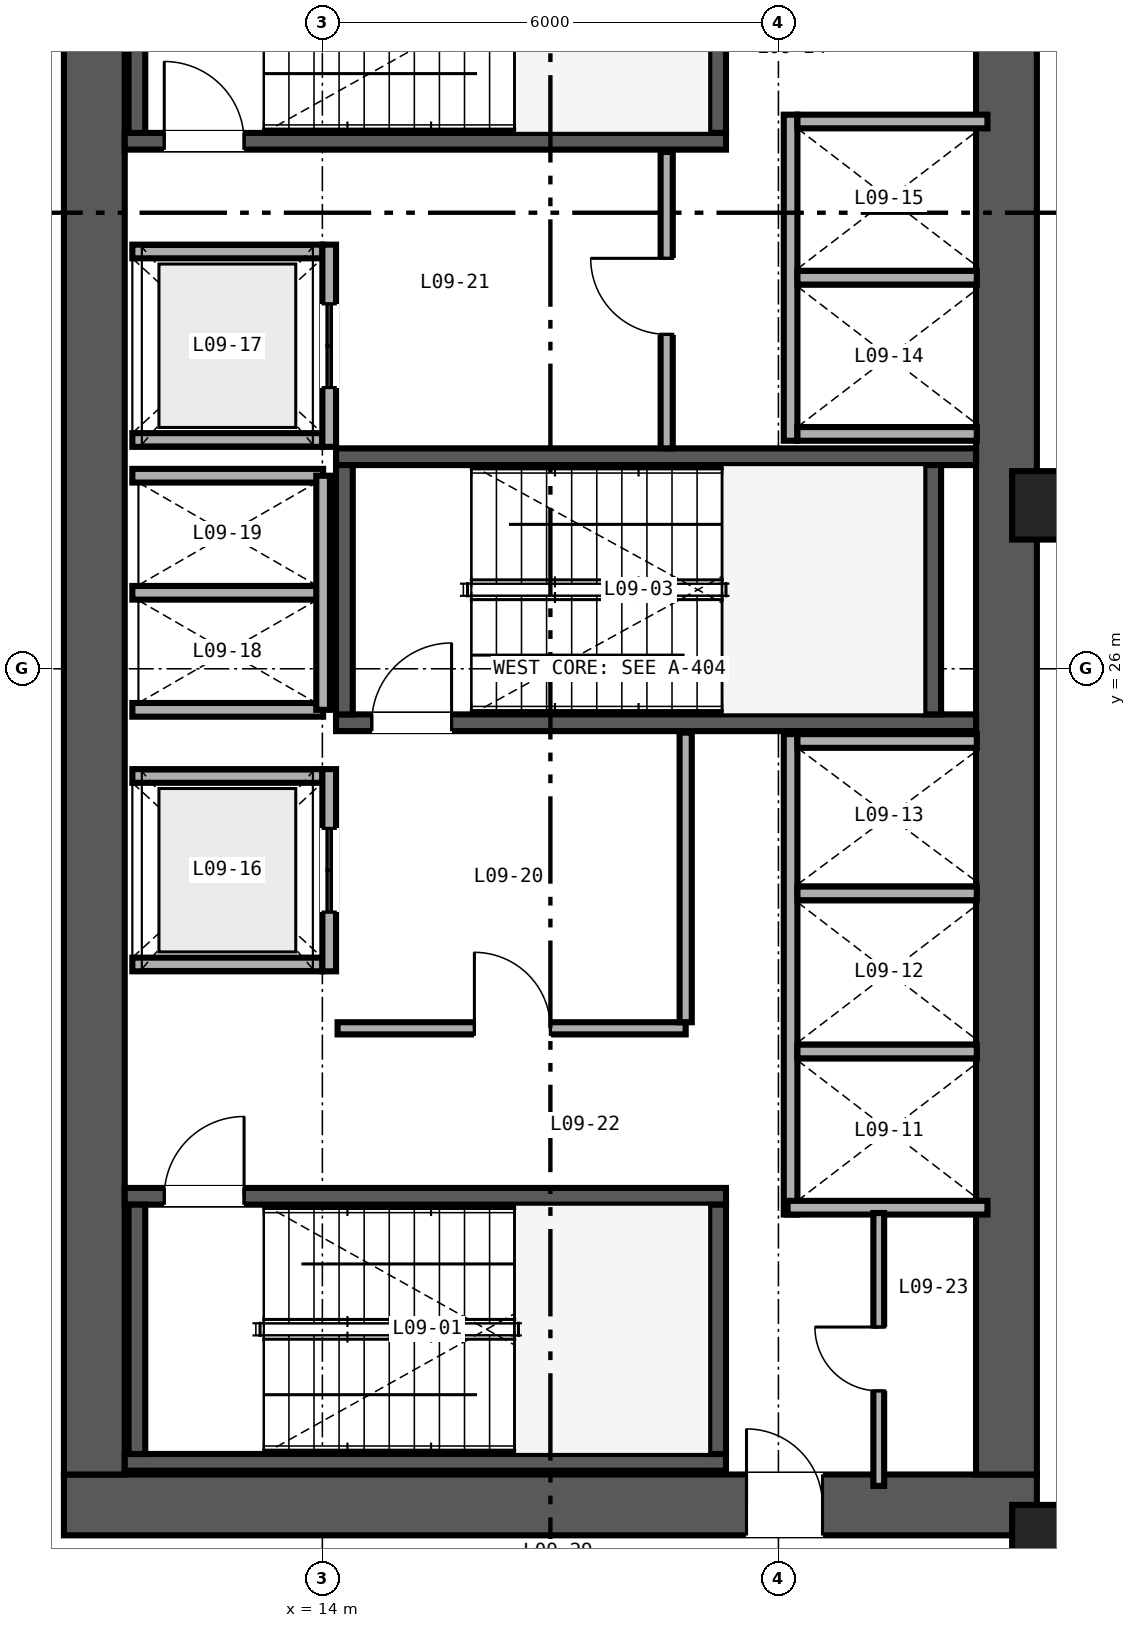
"""IFC4 building model, lengths in metres.
Left out: names, types, materials, properties, quantities, classifications, styles, units other than length and angle.
Written with IfcOpenShell. Run it as: python <this file> out.ifc"""

import sys

from ifc_helpers import new_model, si_unit, direction, frame, frame_2d, origin, origin_2d, place, context, subcontext, project, spatial, rectangle, hollow_rectangle, extrude, source, transform, mapped, element, fill, save


model = new_model("IFC4")
c1 = context("Model", 3, precision=1e-05, world=origin(), true_north=direction((0.0, 1.0)))
c2 = subcontext(c1, "Body", "Model", "MODEL_VIEW")
j1 = project(units=[si_unit("LENGTHUNIT", "METRE"), si_unit("PLANEANGLEUNIT", "RADIAN")], contexts=[c1])
p1 = place(None, origin())
s1 = spatial("IfcSite", under=j1, at=p1, CompositionType="ELEMENT")
p2 = place(p1, origin())
s2 = spatial("IfcBuilding", under=s1, at=p2, CompositionType="ELEMENT")
p3 = place(p2, frame((0.0, 0.0, 42.0)))
s3 = spatial("IfcBuildingStorey", under=s2, at=p3, CompositionType="ELEMENT", Elevation=42.0)
p4 = place(p3, frame((10.6, 15.0, 0.0), z_axis=(0.0, 0.0, 1.0), x_axis=(1.0, 0.0, 0.0)))
e1 = element("IfcWall", 1, at=p4, inside=s3, PredefinedType="SHEAR", context=c2, shape_type="SweptSolid", body=[
    extrude(rectangle(XDim=12.8, YDim=0.8, at=frame_2d((6.4, 0.0))), origin(), (0.0, 0.0, 1.0), 3.35),
])
p5 = place(p4, frame((8.98, 0.0, 0.0)))
e2 = element("IfcOpeningElement", 2, at=p5, cuts=e1, PredefinedType="OPENING", context=c2, shape_type="SweptSolid", body=[
    extrude(rectangle(XDim=1.0, YDim=2.15, at=frame_2d((0.5, 1.075))), frame((0.0, 0.41, 0.0), z_axis=(0.0, -1.0, 0.0), x_axis=(1.0, 0.0, 0.0)), (0.0, 0.0, 1.0), 0.82),
])
for number, where, z_axis, x_axis in (
    (3, (11.0, 15.4, 0.0), (0.0, 0.0, 1.0), (0.0, 1.0, 0.0)),
    (4, (23.0, 15.4, 0.0), (0.0, 0.0, 1.0), (0.0, 1.0, 0.0)),
):
    element("IfcWall", number, at=place(p3, frame(where, z_axis=z_axis, x_axis=x_axis)), inside=s3, PredefinedType="SHEAR", context=c2, shape_type="SweptSolid", body=[
        extrude(rectangle(XDim=21.2, YDim=0.8, at=frame_2d((10.6, 0.0))), origin(), (0.0, 0.0, 1.0), 3.35),
    ])
p6 = place(p3, frame((11.4, 15.56, 0.0), z_axis=(0.0, 0.0, 1.0), x_axis=(1.0, 0.0, 0.0)))
e5 = element("IfcWall", 5, at=p6, inside=s3, PredefinedType="SHEAR", context=c2, shape_type="SweptSolid", body=[
    extrude(rectangle(XDim=7.91, YDim=0.22, at=frame_2d((3.955, 0.0))), origin(), (0.0, 0.0, 1.0), 3.4),
])
p7 = place(p3, frame((11.4, 19.06, 0.0), z_axis=(0.0, 0.0, 1.0), x_axis=(1.0, 0.0, 0.0)))
e6 = element("IfcWall", 6, at=p7, inside=s3, PredefinedType="SHEAR", context=c2, shape_type="SweptSolid", body=[
    extrude(rectangle(XDim=7.91, YDim=0.22, at=frame_2d((3.955, 0.0))), origin(), (0.0, 0.0, 1.0), 3.4),
])
p8 = place(p7, frame((0.52, 0.0, 0.0)))
e7 = element("IfcOpeningElement", 7, at=p8, cuts=e6, PredefinedType="OPENING", context=c2, shape_type="SweptSolid", body=[
    extrude(rectangle(XDim=1.05, YDim=2.15, at=frame_2d((0.525, 1.075))), frame((0.0, 0.12, 0.0), z_axis=(0.0, -1.0, 0.0), x_axis=(1.0, 0.0, 0.0)), (0.0, 0.0, 1.0), 0.24),
])
for number, where, z_axis, x_axis in (
    (8, (11.56, 15.67, 0.0), (0.0, 0.0, 1.0), (0.0, 1.0, 0.0)),
    (9, (19.2, 15.67, 0.0), (0.0, 0.0, 1.0), (0.0, 1.0, 0.0)),
):
    element("IfcWall", number, at=place(p3, frame(where, z_axis=z_axis, x_axis=x_axis)), inside=s3, PredefinedType="SHEAR", context=c2, shape_type="SweptSolid", body=[
        extrude(rectangle(XDim=3.28, YDim=0.22, at=frame_2d((1.64, 0.0))), origin(), (0.0, 0.0, 1.0), 3.4),
    ])
p9 = place(p3, frame((11.4, 32.94, 0.0), z_axis=(0.0, 0.0, 1.0), x_axis=(1.0, 0.0, 0.0)))
e10 = element("IfcWall", 10, at=p9, inside=s3, PredefinedType="SHEAR", context=c2, shape_type="SweptSolid", body=[
    extrude(rectangle(XDim=7.91, YDim=0.22, at=frame_2d((3.955, 0.0))), origin(), (0.0, 0.0, 1.0), 3.4),
])
p10 = place(p9, frame((0.52, 0.0, 0.0)))
e11 = element("IfcOpeningElement", 11, at=p10, cuts=e10, PredefinedType="OPENING", context=c2, shape_type="SweptSolid", body=[
    extrude(rectangle(XDim=1.05, YDim=2.15, at=frame_2d((0.525, 1.075))), frame((0.0, 0.12, 0.0), z_axis=(0.0, -1.0, 0.0), x_axis=(1.0, 0.0, 0.0)), (0.0, 0.0, 1.0), 0.24),
])
for number, where, z_axis, x_axis in (
    (12, (11.56, 33.05, 0.0), (0.0, 0.0, 1.0), (0.0, 1.0, 0.0)),
    (13, (19.2, 33.05, 0.0), (0.0, 0.0, 1.0), (0.0, 1.0, 0.0)),
):
    element("IfcWall", number, at=place(p3, frame(where, z_axis=z_axis, x_axis=x_axis)), inside=s3, PredefinedType="SHEAR", context=c2, shape_type="SweptSolid", body=[
        extrude(rectangle(XDim=3.28, YDim=0.22, at=frame_2d((1.64, 0.0))), origin(), (0.0, 0.0, 1.0), 3.4),
    ])
p11 = place(p3, frame((14.18, 25.29, 0.0), z_axis=(0.0, 0.0, 1.0), x_axis=(1.0, 0.0, 0.0)))
e14 = element("IfcWall", 14, at=p11, inside=s3, PredefinedType="SHEAR", context=c2, shape_type="SweptSolid", body=[
    extrude(rectangle(XDim=8.42, YDim=0.22, at=frame_2d((4.21, 0.0))), origin(), (0.0, 0.0, 1.0), 3.4),
])
p12 = place(p11, frame((0.47, 0.0, 0.0)))
e15 = element("IfcOpeningElement", 15, at=p12, cuts=e14, PredefinedType="OPENING", context=c2, shape_type="SweptSolid", body=[
    extrude(rectangle(XDim=1.05, YDim=2.15, at=frame_2d((0.525, 1.075))), frame((0.0, 0.12, 0.0), z_axis=(0.0, -1.0, 0.0), x_axis=(1.0, 0.0, 0.0)), (0.0, 0.0, 1.0), 0.24),
])
p13 = place(p3, frame((14.18, 28.79, 0.0), z_axis=(0.0, 0.0, 1.0), x_axis=(1.0, 0.0, 0.0)))
e16 = element("IfcWall", 16, at=p13, inside=s3, PredefinedType="SHEAR", context=c2, shape_type="SweptSolid", body=[
    extrude(rectangle(XDim=8.42, YDim=0.22, at=frame_2d((4.21, 0.0))), origin(), (0.0, 0.0, 1.0), 3.4),
])
for number, where, z_axis, x_axis in (
    (17, (14.29, 25.4, 0.0), (0.0, 0.0, 1.0), (0.0, 1.0, 0.0)),
    (18, (22.03, 25.4, 0.0), (0.0, 0.0, 1.0), (0.0, 1.0, 0.0)),
):
    element("IfcWall", number, at=place(p3, frame(where, z_axis=z_axis, x_axis=x_axis)), inside=s3, PredefinedType="SHEAR", context=c2, shape_type="SweptSolid", body=[
        extrude(rectangle(XDim=3.28, YDim=0.22, at=frame_2d((1.64, 0.0))), origin(), (0.0, 0.0, 1.0), 3.4),
    ])
m1 = source(origin(), c2, "Body", "SweptSolid", [
    extrude(hollow_rectangle(XDim=0.85, YDim=0.9, WallThickness=0.04, at=origin_2d()), origin(), (0.0, 0.0, 1.0), 3.35),
])
for number, where, z_axis, x_axis in (
    (19, (23.5, 14.55, 0.0), (0.0, 0.0, 1.0), (1.0, 0.0, 0.0)),
    (20, (23.5, 28.15, 0.0), (0.0, 0.0, 1.0), (1.0, 0.0, 0.0)),
):
    element("IfcColumn", number, at=place(p3, frame(where, z_axis=z_axis, x_axis=x_axis)), inside=s3, PredefinedType="COLUMN", context=c2, shape_type="MappedRepresentation", body=[
        mapped(m1, transform((0.0, 0.0, 0.0), scale=1.0)),
    ])
p14 = place(p3, frame((20.16, 18.82, 0.0), z_axis=(0.0, 0.0, 1.0), x_axis=(0.0, 1.0, 0.0)))
e21 = element("IfcWall", 21, at=p14, inside=s3, PredefinedType="SOLIDWALL", context=c2, shape_type="SweptSolid", body=[
    extrude(rectangle(XDim=6.32, YDim=0.18, at=frame_2d((3.16, 0.0))), origin(), (0.0, 0.0, 1.0), 2.36),
])
p15 = place(p3, frame((20.12, 18.91, 0.0), z_axis=(0.0, 0.0, 1.0), x_axis=(1.0, 0.0, 0.0)))
e22 = element("IfcWall", 22, at=p15, inside=s3, PredefinedType="SOLIDWALL", context=c2, shape_type="SweptSolid", body=[
    extrude(rectangle(XDim=2.63, YDim=0.18, at=frame_2d((1.315, 0.0))), origin(), (0.0, 0.0, 1.0), 3.35),
])
p16 = place(p3, frame((20.25, 25.05, 0.0), z_axis=(0.0, 0.0, 1.0), x_axis=(1.0, 0.0, 0.0)))
e23 = element("IfcWall", 23, at=p16, inside=s3, PredefinedType="SOLIDWALL", context=c2, shape_type="SweptSolid", body=[
    extrude(rectangle(XDim=2.36, YDim=0.18, at=frame_2d((1.18, 0.0))), origin(), (0.0, 0.0, 1.0), 3.35),
])
p17 = place(p3, frame((20.25, 20.965, 0.0), z_axis=(0.0, 0.0, 1.0), x_axis=(1.0, 0.0, 0.0)))
e24 = element("IfcWall", 24, at=p17, inside=s3, PredefinedType="SOLIDWALL", context=c2, shape_type="SweptSolid", body=[
    extrude(rectangle(XDim=2.36, YDim=0.18, at=frame_2d((1.18, 0.0))), origin(), (0.0, 0.0, 1.0), 2.36),
])
p18 = place(p3, frame((20.25, 23.045, 0.0), z_axis=(0.0, 0.0, 1.0), x_axis=(1.0, 0.0, 0.0)))
e25 = element("IfcWall", 25, at=p18, inside=s3, PredefinedType="SOLIDWALL", context=c2, shape_type="SweptSolid", body=[
    extrude(rectangle(XDim=2.36, YDim=0.18, at=frame_2d((1.18, 0.0))), origin(), (0.0, 0.0, 1.0), 3.35),
])
p19 = place(p3, frame((20.16, 29.0, 0.0), z_axis=(0.0, 0.0, 1.0), x_axis=(0.0, 1.0, 0.0)))
e26 = element("IfcWall", 26, at=p19, inside=s3, PredefinedType="SOLIDWALL", context=c2, shape_type="SweptSolid", body=[
    extrude(rectangle(XDim=4.29, YDim=0.18, at=frame_2d((2.145, 0.0))), origin(), (0.0, 0.0, 1.0), 3.35),
])
p20 = place(p3, frame((20.25, 29.09, 0.0), z_axis=(0.0, 0.0, 1.0), x_axis=(1.0, 0.0, 0.0)))
e27 = element("IfcWall", 27, at=p20, inside=s3, PredefinedType="SOLIDWALL", context=c2, shape_type="SweptSolid", body=[
    extrude(rectangle(XDim=2.36, YDim=0.18, at=frame_2d((1.18, 0.0))), origin(), (0.0, 0.0, 1.0), 3.35),
])
p21 = place(p3, frame((20.25, 33.2, 0.0), z_axis=(0.0, 0.0, 1.0), x_axis=(1.0, 0.0, 0.0)))
e28 = element("IfcWall", 28, at=p21, inside=s3, PredefinedType="SOLIDWALL", context=c2, shape_type="SweptSolid", body=[
    extrude(rectangle(XDim=2.5, YDim=0.18, at=frame_2d((1.25, 0.0))), origin(), (0.0, 0.0, 1.0), 3.35),
])
p22 = place(p3, frame((20.25, 31.145, 0.0), z_axis=(0.0, 0.0, 1.0), x_axis=(1.0, 0.0, 0.0)))
e29 = element("IfcWall", 29, at=p22, inside=s3, PredefinedType="SOLIDWALL", context=c2, shape_type="SweptSolid", body=[
    extrude(rectangle(XDim=2.36, YDim=0.18, at=frame_2d((1.18, 0.0))), origin(), (0.0, 0.0, 1.0), 3.35),
])
for number, where, z_axis, x_axis in (
    (30, (11.5, 22.11, 0.0), (0.0, 0.0, 1.0), (1.0, 0.0, 0.0)),
    (31, (11.5, 24.59, 0.0), (0.0, 0.0, 1.0), (1.0, 0.0, 0.0)),
):
    element("IfcWall", number, at=place(p3, frame(where, z_axis=z_axis, x_axis=x_axis)), inside=s3, PredefinedType="SOLIDWALL", context=c2, shape_type="SweptSolid", body=[
        extrude(rectangle(XDim=2.5, YDim=0.18, at=frame_2d((1.25, 0.0))), origin(), (0.0, 0.0, 1.0), 3.35),
    ])
p23 = place(p3, frame((14.09, 22.02, 0.0), z_axis=(0.0, 0.0, 1.0), x_axis=(0.0, 1.0, 0.0)))
e32 = element("IfcWall", 32, at=p23, inside=s3, PredefinedType="SOLIDWALL", context=c2, shape_type="SweptSolid", body=[
    extrude(rectangle(XDim=2.66, YDim=0.18, at=frame_2d((1.33, 0.0))), origin(), (0.0, 0.0, 1.0), 3.35),
])
p24 = place(p23, frame((0.78, 0.0, 0.0)))
e33 = element("IfcOpeningElement", 33, at=p24, cuts=e32, PredefinedType="OPENING", context=c2, shape_type="SweptSolid", body=[
    extrude(rectangle(XDim=1.1, YDim=2.2, at=frame_2d((0.55, 1.1))), frame((0.0, 0.1, 0.0), z_axis=(0.0, -1.0, 0.0), x_axis=(1.0, 0.0, 0.0)), (0.0, 0.0, 1.0), 0.2),
])
for number, where, z_axis, x_axis in (
    (34, (11.5, 29.01, 0.0), (0.0, 0.0, 1.0), (1.0, 0.0, 0.0)),
    (35, (11.5, 31.49, 0.0), (0.0, 0.0, 1.0), (1.0, 0.0, 0.0)),
):
    element("IfcWall", number, at=place(p3, frame(where, z_axis=z_axis, x_axis=x_axis)), inside=s3, PredefinedType="SOLIDWALL", context=c2, shape_type="SweptSolid", body=[
        extrude(rectangle(XDim=2.5, YDim=0.18, at=frame_2d((1.25, 0.0))), origin(), (0.0, 0.0, 1.0), 3.35),
    ])
p25 = place(p3, frame((14.09, 28.92, 0.0), z_axis=(0.0, 0.0, 1.0), x_axis=(0.0, 1.0, 0.0)))
e36 = element("IfcWall", 36, at=p25, inside=s3, PredefinedType="SOLIDWALL", context=c2, shape_type="SweptSolid", body=[
    extrude(rectangle(XDim=2.66, YDim=0.18, at=frame_2d((1.33, 0.0))), origin(), (0.0, 0.0, 1.0), 3.35),
])
p26 = place(p25, frame((0.78, 0.0, 0.0)))
e37 = element("IfcOpeningElement", 37, at=p26, cuts=e36, PredefinedType="OPENING", context=c2, shape_type="SweptSolid", body=[
    extrude(rectangle(XDim=1.1, YDim=2.2, at=frame_2d((0.55, 1.1))), frame((0.0, 0.1, 0.0), z_axis=(0.0, -1.0, 0.0), x_axis=(1.0, 0.0, 0.0)), (0.0, 0.0, 1.0), 0.2),
])
for number, where, z_axis, x_axis in (
    (38, (11.5, 25.46, 0.0), (0.0, 0.0, 1.0), (1.0, 0.0, 0.0)),
    (39, (11.5, 27.0, 0.0), (0.0, 0.0, 1.0), (1.0, 0.0, 0.0)),
    (40, (11.5, 28.54, 0.0), (0.0, 0.0, 1.0), (1.0, 0.0, 0.0)),
):
    element("IfcWall", number, at=place(p3, frame(where, z_axis=z_axis, x_axis=x_axis)), inside=s3, PredefinedType="SOLIDWALL", context=c2, shape_type="SweptSolid", body=[
        extrude(rectangle(XDim=2.51, YDim=0.18, at=frame_2d((1.255, 0.0))), origin(), (0.0, 0.0, 1.0), 3.35),
    ])
p27 = place(p3, frame((14.01, 25.46, 0.0), z_axis=(0.0, 0.0, 1.0), x_axis=(0.0, 1.0, 0.0)))
e41 = element("IfcWall", 41, at=p27, inside=s3, PredefinedType="SOLIDWALL", context=c2, shape_type="SweptSolid", body=[
    extrude(rectangle(XDim=3.08, YDim=0.18, at=frame_2d((1.54, 0.0))), origin(), (0.0, 0.0, 1.0), 3.35),
])
p28 = place(p3, frame((14.2, 21.27, 0.0), z_axis=(0.0, 0.0, 1.0), x_axis=(1.0, 0.0, 0.0)))
e42 = element("IfcWall", 42, at=p28, inside=s3, PredefinedType="PARTITIONING", context=c2, shape_type="SweptSolid", body=[
    extrude(rectangle(XDim=4.58, YDim=0.16, at=frame_2d((2.29, 0.0))), origin(), (0.0, 0.0, 1.0), 3.35),
])
p29 = place(p28, frame((1.8, 0.0, 0.0)))
e43 = element("IfcOpeningElement", 43, at=p29, cuts=e42, PredefinedType="OPENING", context=c2, shape_type="SweptSolid", body=[
    extrude(rectangle(XDim=1.0, YDim=2.15, at=frame_2d((0.5, 1.075))), frame((0.0, 0.09, 0.0), z_axis=(0.0, -1.0, 0.0), x_axis=(1.0, 0.0, 0.0)), (0.0, 0.0, 1.0), 0.18),
])
p30 = place(p3, frame((18.78, 21.35, 0.0), z_axis=(0.0, 0.0, 1.0), x_axis=(0.0, 1.0, 0.0)))
e44 = element("IfcWall", 44, at=p30, inside=s3, PredefinedType="PARTITIONING", context=c2, shape_type="SweptSolid", body=[
    extrude(rectangle(XDim=3.81, YDim=0.16, at=frame_2d((1.905, 0.0))), origin(), (0.0, 0.0, 1.0), 3.35),
])
p31 = place(p3, frame((18.53, 28.9, 0.0), z_axis=(0.0, 0.0, 1.0), x_axis=(0.0, 1.0, 0.0)))
e45 = element("IfcWall", 45, at=p31, inside=s3, PredefinedType="PARTITIONING", context=c2, shape_type="SweptSolid", body=[
    extrude(rectangle(XDim=3.9, YDim=0.16, at=frame_2d((1.95, 0.0))), origin(), (0.0, 0.0, 1.0), 3.35),
])
p32 = place(p31, frame((1.5, 0.0, 0.0)))
e46 = element("IfcOpeningElement", 46, at=p32, cuts=e45, PredefinedType="OPENING", context=c2, shape_type="SweptSolid", body=[
    extrude(rectangle(XDim=1.0, YDim=2.15, at=frame_2d((0.5, 1.075))), frame((0.0, 0.09, 0.0), z_axis=(0.0, -1.0, 0.0), x_axis=(1.0, 0.0, 0.0)), (0.0, 0.0, 1.0), 0.18),
])
p33 = place(p3, frame((21.32, 15.25, 0.0), z_axis=(0.0, 0.0, 1.0), x_axis=(0.0, 1.0, 0.0)))
e47 = element("IfcWall", 47, at=p33, inside=s3, PredefinedType="PARTITIONING", context=c2, shape_type="SweptSolid", body=[
    extrude(rectangle(XDim=3.59, YDim=0.142, at=frame_2d((1.795, 0.0))), origin(), (0.0, 0.0, 1.0), 3.35),
])
p34 = place(p33, frame((1.25, 0.0, 0.0)))
e48 = element("IfcOpeningElement", 48, at=p34, cuts=e47, PredefinedType="OPENING", context=c2, shape_type="SweptSolid", body=[
    extrude(rectangle(XDim=0.84, YDim=2.1, at=frame_2d((0.42, 1.05))), frame((0.0, 0.081, 0.0), z_axis=(0.0, -1.0, 0.0), x_axis=(1.0, 0.0, 0.0)), (0.0, 0.0, 1.0), 0.162),
])
m2 = source(origin(), c2, "Body", "SweptSolid", [
    extrude(rectangle(XDim=1.05, YDim=2.15, at=frame_2d((0.525, 1.075))), frame((0.0, 0.025, 0.0), z_axis=(0.0, -1.0, 0.0), x_axis=(1.0, 0.0, 0.0)), (0.0, 0.0, 1.0), 0.05),
])
p35 = place(p8, origin())
e49 = element("IfcDoor", 49, at=p35, inside=s3, OperationType="SINGLE_SWING_RIGHT", PredefinedType="DOOR", context=c2, shape_type="MappedRepresentation", body=[
    mapped(m2, transform((0.0, 0.0, 0.0), scale=1.0)),
])
fill(e7, e49)
p36 = place(p10, origin())
e50 = element("IfcDoor", 50, at=p36, inside=s3, OperationType="SINGLE_SWING_LEFT", PredefinedType="DOOR", context=c2, shape_type="MappedRepresentation", body=[
    mapped(m2, transform((0.0, 0.0, 0.0), scale=1.0)),
])
fill(e11, e50)
p37 = place(p12, origin())
e51 = element("IfcDoor", 51, at=p37, inside=s3, OperationType="SINGLE_SWING_RIGHT", PredefinedType="DOOR", context=c2, shape_type="MappedRepresentation", body=[
    mapped(m2, transform((0.0, 0.0, 0.0), scale=1.0)),
])
fill(e15, e51)
m3 = source(origin(), c2, "Body", "SweptSolid", [
    extrude(rectangle(XDim=1.1, YDim=2.2, at=frame_2d((0.55, 1.1))), frame((0.0, 0.025, 0.0), z_axis=(0.0, -1.0, 0.0), x_axis=(1.0, 0.0, 0.0)), (0.0, 0.0, 1.0), 0.05),
])
p38 = place(p24, origin())
e52 = element("IfcDoor", 52, at=p38, inside=s3, OperationType="DOUBLE_DOOR_SLIDING", PredefinedType="DOOR", context=c2, shape_type="MappedRepresentation", body=[
    mapped(m3, transform((0.0, 0.0, 0.0), scale=1.0)),
])
fill(e33, e52)
p39 = place(p26, origin())
e53 = element("IfcDoor", 53, at=p39, inside=s3, OperationType="DOUBLE_DOOR_SLIDING", PredefinedType="DOOR", context=c2, shape_type="MappedRepresentation", body=[
    mapped(m3, transform((0.0, 0.0, 0.0), scale=1.0)),
])
fill(e37, e53)
m4 = source(origin(), c2, "Body", "SweptSolid", [
    extrude(rectangle(XDim=1.0, YDim=2.15, at=frame_2d((0.5, 1.075))), frame((0.0, 0.025, 0.0), z_axis=(0.0, -1.0, 0.0), x_axis=(1.0, 0.0, 0.0)), (0.0, 0.0, 1.0), 0.05),
])
p40 = place(p29, origin())
e54 = element("IfcDoor", 54, at=p40, inside=s3, OperationType="SINGLE_SWING_LEFT", PredefinedType="DOOR", context=c2, shape_type="MappedRepresentation", body=[
    mapped(m4, transform((0.0, 0.0, 0.0), scale=1.0)),
])
fill(e43, e54)
p41 = place(p32, origin())
e55 = element("IfcDoor", 55, at=p41, inside=s3, OperationType="SINGLE_SWING_RIGHT", PredefinedType="DOOR", context=c2, shape_type="MappedRepresentation", body=[
    mapped(m4, transform((0.0, 0.0, 0.0), scale=1.0)),
])
fill(e46, e55)
m5 = source(origin(), c2, "Body", "SweptSolid", [
    extrude(rectangle(XDim=0.84, YDim=2.1, at=frame_2d((0.42, 1.05))), frame((0.0, 0.025, 0.0), z_axis=(0.0, -1.0, 0.0), x_axis=(1.0, 0.0, 0.0)), (0.0, 0.0, 1.0), 0.05),
])
p42 = place(p34, origin())
e56 = element("IfcDoor", 56, at=p42, inside=s3, OperationType="SINGLE_SWING_RIGHT", PredefinedType="DOOR", context=c2, shape_type="MappedRepresentation", body=[
    mapped(m5, transform((0.0, 0.0, 0.0), scale=1.0)),
])
fill(e48, e56)
p43 = place(p5, origin())
e57 = element("IfcDoor", 57, at=p43, inside=s3, OperationType="SINGLE_SWING_LEFT", PredefinedType="DOOR", context=c2, shape_type="MappedRepresentation", body=[
    mapped(m4, transform((0.0, 0.0, 0.0), scale=1.0)),
])
fill(e2, e57)
save(model, sys.argv[1])
